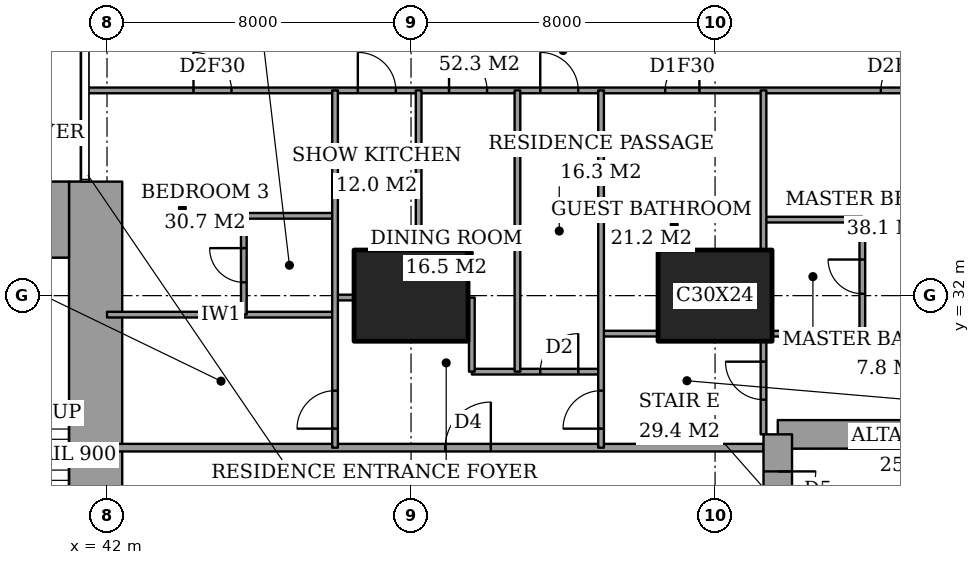
"""IFC4 building model, lengths in metres.
Left out: names, types, materials, properties, quantities, classifications, styles, units other than length and angle.
Written with IfcOpenShell. Run it as: python <this file> out.ifc"""

import sys

from ifc_helpers import new_model, si_unit, direction, frame, frame_2d, origin, origin_2d, place, context, subcontext, project, spatial, rectangle, extrude, element, fill, save


model = new_model("IFC4")
c1 = context("Model", 3, precision=1e-05, world=origin(), true_north=direction((0.0, 1.0)))
c2 = subcontext(c1, "Body", "Model", "MODEL_VIEW")
j1 = project(units=[si_unit("LENGTHUNIT", "METRE"), si_unit("PLANEANGLEUNIT", "RADIAN")], contexts=[c1])
p1 = place(None, origin())
s1 = spatial("IfcSite", under=j1, at=p1, CompositionType="ELEMENT")
p2 = place(p1, origin())
s2 = spatial("IfcBuilding", under=s1, at=p2, CompositionType="ELEMENT")
p3 = place(p2, frame((0.0, 0.0, 29.6)))
s3 = spatial("IfcBuildingStorey", under=s2, at=p3, CompositionType="ELEMENT", Elevation=29.6)
for number, where, z_axis, x_axis in (
    (1, (50.0, 32.0, 0.0), (0.0, 0.0, 1.0), (1.0, 0.0, 0.0)),
    (2, (58.0, 32.0, 0.0), (0.0, 0.0, 1.0), (1.0, 0.0, 0.0)),
):
    element("IfcColumn", number, at=place(p3, frame(where, z_axis=z_axis, x_axis=x_axis)), inside=s3, PredefinedType="COLUMN", context=c2, shape_type="SweptSolid", body=[
        extrude(rectangle(XDim=3.0, YDim=2.4, at=origin_2d()), origin(), (0.0, 0.0, 1.0), 3.6),
    ])
p4 = place(p3, frame((37.85, 34.0, 0.0), z_axis=(0.0, 0.0, 1.0), x_axis=(1.0, 0.0, 0.0)))
e3 = element("IfcWall", 3, at=p4, inside=s3, PredefinedType="SHEAR", context=c2, shape_type="SweptSolid", body=[
    extrude(rectangle(XDim=3.15, YDim=2.0, at=frame_2d((1.575, 0.0))), origin(), (0.0, 0.0, 1.0), 3.6),
])
p5 = place(p3, frame((41.7, 24.85, 0.0), z_axis=(0.0, 0.0, 1.0), x_axis=(0.0, 1.0, 0.0)))
e4 = element("IfcWall", 4, at=p5, inside=s3, PredefinedType="SHEAR", context=c2, shape_type="SweptSolid", body=[
    extrude(rectangle(XDim=10.15, YDim=1.4, at=frame_2d((5.075, 0.0))), origin(), (0.0, 0.0, 1.0), 3.6),
])
p6 = place(p3, frame((64.1, 28.35, 0.0), z_axis=(0.0, 0.0, 1.0), x_axis=(-1.0, 0.0, 0.0)))
e5 = element("IfcWall", 5, at=p6, inside=s3, PredefinedType="SHEAR", context=c2, shape_type="SweptSolid", body=[
    extrude(rectangle(XDim=4.45, YDim=0.75, at=frame_2d((2.225, 0.0))), origin(), (0.0, 0.0, 1.0), 3.6),
])
p7 = place(p3, frame((59.65, 28.35, 0.0), z_axis=(0.0, 0.0, 1.0), x_axis=(0.0, -1.0, 0.0)))
e6 = element("IfcWall", 6, at=p7, inside=s3, PredefinedType="SHEAR", context=c2, shape_type="SweptSolid", body=[
    extrude(rectangle(XDim=8.7, YDim=0.75, at=frame_2d((4.35, 0.0))), origin(), (0.0, 0.0, 1.0), 3.6),
])
p8 = place(p7, frame((0.975, 0.0, 0.0)))
e7 = element("IfcOpeningElement", 7, at=p8, cuts=e6, PredefinedType="OPENING", context=c2, shape_type="SweptSolid", body=[
    extrude(rectangle(XDim=1.0, YDim=2.1, at=frame_2d((0.5, 1.05))), frame((0.0, 0.385, 0.0), z_axis=(0.0, -1.0, 0.0), x_axis=(1.0, 0.0, 0.0)), (0.0, 0.0, 1.0), 0.77),
])
p9 = place(p3, frame((42.0, 28.0, 0.0), z_axis=(0.0, 0.0, 1.0), x_axis=(1.0, 0.0, 0.0)))
e8 = element("IfcWall", 8, at=p9, inside=s3, PredefinedType="PARTITIONING", context=c2, shape_type="SweptSolid", body=[
    extrude(rectangle(XDim=17.275, YDim=0.2, at=frame_2d((8.637, 0.0))), origin(), (0.0, 0.0, 1.0), 3.35),
])
p10 = place(p9, frame((8.9, 0.0, 0.0)))
e9 = element("IfcOpeningElement", 9, at=p10, cuts=e8, PredefinedType="OPENING", context=c2, shape_type="SweptSolid", body=[
    extrude(rectangle(XDim=1.2, YDim=2.4, at=frame_2d((0.6, 1.2))), frame((0.0, 0.11, 0.0), z_axis=(0.0, -1.0, 0.0), x_axis=(1.0, 0.0, 0.0)), (0.0, 0.0, 1.0), 0.22),
])
p11 = place(p3, frame((51.6, 30.0, 0.0), z_axis=(0.0, 0.0, 1.0), x_axis=(1.0, 0.0, 0.0)))
e10 = element("IfcWall", 10, at=p11, inside=s3, PredefinedType="PARTITIONING", context=c2, shape_type="SweptSolid", body=[
    extrude(rectangle(XDim=3.4, YDim=0.15, at=frame_2d((1.7, 0.0))), origin(), (0.0, 0.0, 1.0), 3.35),
])
p12 = place(p11, frame((1.8, 0.0, 0.0)))
e11 = element("IfcOpeningElement", 11, at=p12, cuts=e10, PredefinedType="OPENING", context=c2, shape_type="SweptSolid", body=[
    extrude(rectangle(XDim=1.0, YDim=2.1, at=frame_2d((0.5, 1.05))), frame((0.0, 0.085, 0.0), z_axis=(0.0, -1.0, 0.0), x_axis=(1.0, 0.0, 0.0)), (0.0, 0.0, 1.0), 0.17),
])
p13 = place(p3, frame((55.0, 31.0, 0.0), z_axis=(0.0, 0.0, 1.0), x_axis=(1.0, 0.0, 0.0)))
e12 = element("IfcWall", 12, at=p13, inside=s3, PredefinedType="PARTITIONING", context=c2, shape_type="SweptSolid", body=[
    extrude(rectangle(XDim=1.5, YDim=0.15, at=frame_2d((0.75, 0.0))), origin(), (0.0, 0.0, 1.0), 3.35),
])
p14 = place(p3, frame((59.5, 31.0, 0.0), z_axis=(0.0, 0.0, 1.0), x_axis=(1.0, 0.0, 0.0)))
e13 = element("IfcWall", 13, at=p14, inside=s3, PredefinedType="PARTITIONING", context=c2, shape_type="SweptSolid", body=[
    extrude(rectangle(XDim=5.15, YDim=0.15, at=frame_2d((2.575, 0.0))), origin(), (0.0, 0.0, 1.0), 3.35),
])
p15 = place(p3, frame((42.0, 31.5, 0.0), z_axis=(0.0, 0.0, 1.0), x_axis=(1.0, 0.0, 0.0)))
e14 = element("IfcWall", 14, at=p15, inside=s3, PredefinedType="PARTITIONING", context=c2, shape_type="SweptSolid", body=[
    extrude(rectangle(XDim=6.0, YDim=0.15, at=frame_2d((3.0, 0.0))), origin(), (0.0, 0.0, 1.0), 3.35),
])
p16 = place(p3, frame((48.0, 31.95, 0.0), z_axis=(0.0, 0.0, 1.0), x_axis=(1.0, 0.0, 0.0)))
e15 = element("IfcWall", 15, at=p16, inside=s3, PredefinedType="PARTITIONING", context=c2, shape_type="SweptSolid", body=[
    extrude(rectangle(XDim=0.5, YDim=0.15, at=frame_2d((0.25, 0.0))), origin(), (0.0, 0.0, 1.0), 2.634),
])
p17 = place(p3, frame((59.275, 34.0, 0.0), z_axis=(0.0, 0.0, 1.0), x_axis=(1.0, 0.0, 0.0)))
e16 = element("IfcWall", 16, at=p17, inside=s3, PredefinedType="PARTITIONING", context=c2, shape_type="SweptSolid", body=[
    extrude(rectangle(XDim=2.6, YDim=0.15, at=frame_2d((1.3, 0.0))), origin(), (0.0, 0.0, 1.0), 3.35),
])
p18 = place(p3, frame((45.6, 34.1, 0.0), z_axis=(0.0, 0.0, 1.0), x_axis=(1.0, 0.0, 0.0)))
e17 = element("IfcWall", 17, at=p18, inside=s3, PredefinedType="PARTITIONING", context=c2, shape_type="SweptSolid", body=[
    extrude(rectangle(XDim=2.4, YDim=0.15, at=frame_2d((1.2, 0.0))), origin(), (0.0, 0.0, 1.0), 3.35),
])
p19 = place(p3, frame((41.439, 37.4, 0.0), z_axis=(0.0, 0.0, 1.0), x_axis=(1.0, 0.0, 0.0)))
e18 = element("IfcWall", 18, at=p19, inside=s3, PredefinedType="PARTITIONING", context=c2, shape_type="SweptSolid", body=[
    extrude(rectangle(XDim=25.011, YDim=0.15, at=frame_2d((12.505, 0.0))), origin(), (0.0, 0.0, 1.0), 3.35),
])
p20 = place(p19, frame((11.961, 0.0, 0.0)))
e19 = element("IfcOpeningElement", 19, at=p20, cuts=e18, PredefinedType="OPENING", context=c2, shape_type="SweptSolid", body=[
    extrude(rectangle(XDim=1.0, YDim=2.1, at=frame_2d((0.5, 1.05))), frame((0.0, 0.085, 0.0), z_axis=(0.0, -1.0, 0.0), x_axis=(1.0, 0.0, 0.0)), (0.0, 0.0, 1.0), 0.17),
])
p21 = place(p19, frame((20.924, 0.0, 0.0)))
e20 = element("IfcOpeningElement", 20, at=p21, cuts=e18, PredefinedType="OPENING", context=c2, shape_type="SweptSolid", body=[
    extrude(rectangle(XDim=1.0, YDim=2.1, at=frame_2d((0.5, 1.05))), frame((0.0, 0.085, 0.0), z_axis=(0.0, -1.0, 0.0), x_axis=(1.0, 0.0, 0.0)), (0.0, 0.0, 1.0), 0.17),
])
p22 = place(p19, frame((15.249, 0.0, 0.0)))
e21 = element("IfcOpeningElement", 21, at=p22, cuts=e18, PredefinedType="OPENING", context=c2, shape_type="SweptSolid", body=[
    extrude(rectangle(XDim=0.9, YDim=2.1, at=frame_2d((0.45, 1.05))), frame((0.0, 0.085, 0.0), z_axis=(0.0, -1.0, 0.0), x_axis=(1.0, 0.0, 0.0)), (0.0, 0.0, 1.0), 0.17),
])
p23 = place(p19, frame((9.561, 0.0, 0.0)))
e22 = element("IfcOpeningElement", 22, at=p23, cuts=e18, PredefinedType="OPENING", context=c2, shape_type="SweptSolid", body=[
    extrude(rectangle(XDim=1.0, YDim=2.1, at=frame_2d((0.5, 1.05))), frame((0.0, 0.085, 0.0), z_axis=(0.0, -1.0, 0.0), x_axis=(1.0, 0.0, 0.0)), (0.0, 0.0, 1.0), 0.17),
])
p24 = place(p19, frame((7.161, 0.0, 0.0)))
e23 = element("IfcOpeningElement", 23, at=p24, cuts=e18, PredefinedType="OPENING", context=c2, shape_type="SweptSolid", body=[
    extrude(rectangle(XDim=1.0, YDim=2.1, at=frame_2d((0.5, 1.05))), frame((0.0, 0.085, 0.0), z_axis=(0.0, -1.0, 0.0), x_axis=(1.0, 0.0, 0.0)), (0.0, 0.0, 1.0), 0.17),
])
p25 = place(p19, frame((2.836, 0.0, 0.0)))
e24 = element("IfcOpeningElement", 24, at=p25, cuts=e18, PredefinedType="OPENING", context=c2, shape_type="SweptSolid", body=[
    extrude(rectangle(XDim=1.0, YDim=2.1, at=frame_2d((0.5, 1.05))), frame((0.0, 0.085, 0.0), z_axis=(0.0, -1.0, 0.0), x_axis=(1.0, 0.0, 0.0)), (0.0, 0.0, 1.0), 0.17),
])
p26 = place(p3, frame((45.6, 31.5, 0.0), z_axis=(0.0, 0.0, 1.0), x_axis=(0.0, 1.0, 0.0)))
e25 = element("IfcWall", 25, at=p26, inside=s3, PredefinedType="PARTITIONING", context=c2, shape_type="SweptSolid", body=[
    extrude(rectangle(XDim=2.6, YDim=0.15, at=frame_2d((1.3, 0.0))), origin(), (0.0, 0.0, 1.0), 3.35),
])
p27 = place(p26, frame((0.85, 0.0, 0.0)))
e26 = element("IfcOpeningElement", 26, at=p27, cuts=e25, PredefinedType="OPENING", context=c2, shape_type="SweptSolid", body=[
    extrude(rectangle(XDim=0.9, YDim=2.1, at=frame_2d((0.45, 1.05))), frame((0.0, 0.085, 0.0), z_axis=(0.0, -1.0, 0.0), x_axis=(1.0, 0.0, 0.0)), (0.0, 0.0, 1.0), 0.17),
])
p28 = place(p3, frame((48.0, 28.0, 0.0), z_axis=(0.0, 0.0, 1.0), x_axis=(0.0, 1.0, 0.0)))
e27 = element("IfcWall", 27, at=p28, inside=s3, PredefinedType="PARTITIONING", context=c2, shape_type="SweptSolid", body=[
    extrude(rectangle(XDim=9.4, YDim=0.15, at=frame_2d((4.7, 0.0))), origin(), (0.0, 0.0, 1.0), 3.35),
])
p29 = place(p28, frame((0.5, 0.0, 0.0)))
e28 = element("IfcOpeningElement", 28, at=p29, cuts=e27, PredefinedType="OPENING", context=c2, shape_type="SweptSolid", body=[
    extrude(rectangle(XDim=1.0, YDim=2.1, at=frame_2d((0.5, 1.05))), frame((0.0, 0.085, 0.0), z_axis=(0.0, -1.0, 0.0), x_axis=(1.0, 0.0, 0.0)), (0.0, 0.0, 1.0), 0.17),
])
p30 = place(p3, frame((50.2, 33.2, 0.0), z_axis=(0.0, 0.0, 1.0), x_axis=(0.0, 1.0, 0.0)))
e29 = element("IfcWall", 29, at=p30, inside=s3, PredefinedType="PARTITIONING", context=c2, shape_type="SweptSolid", body=[
    extrude(rectangle(XDim=4.2, YDim=0.15, at=frame_2d((2.1, 0.0))), origin(), (0.0, 0.0, 1.0), 3.35),
])
p31 = place(p3, frame((51.6, 30.0, 0.0), z_axis=(0.0, 0.0, 1.0), x_axis=(0.0, 1.0, 0.0)))
e30 = element("IfcWall", 30, at=p31, inside=s3, PredefinedType="PARTITIONING", context=c2, shape_type="SweptSolid", body=[
    extrude(rectangle(XDim=1.95, YDim=0.15, at=frame_2d((0.975, 0.0))), origin(), (0.0, 0.0, 1.0), 3.35),
])
p32 = place(p3, frame((52.8, 30.0, 0.0), z_axis=(0.0, 0.0, 1.0), x_axis=(0.0, 1.0, 0.0)))
e31 = element("IfcWall", 31, at=p32, inside=s3, PredefinedType="PARTITIONING", context=c2, shape_type="SweptSolid", body=[
    extrude(rectangle(XDim=7.4, YDim=0.15, at=frame_2d((3.7, 0.0))), origin(), (0.0, 0.0, 1.0), 3.35),
])
p33 = place(p3, frame((55.0, 28.0, 0.0), z_axis=(0.0, 0.0, 1.0), x_axis=(0.0, 1.0, 0.0)))
e32 = element("IfcWall", 32, at=p33, inside=s3, PredefinedType="PARTITIONING", context=c2, shape_type="SweptSolid", body=[
    extrude(rectangle(XDim=9.4, YDim=0.15, at=frame_2d((4.7, 0.0))), origin(), (0.0, 0.0, 1.0), 3.35),
])
p34 = place(p33, frame((0.5, 0.0, 0.0)))
e33 = element("IfcOpeningElement", 33, at=p34, cuts=e32, PredefinedType="OPENING", context=c2, shape_type="SweptSolid", body=[
    extrude(rectangle(XDim=1.0, YDim=2.1, at=frame_2d((0.5, 1.05))), frame((0.0, 0.085, 0.0), z_axis=(0.0, -1.0, 0.0), x_axis=(1.0, 0.0, 0.0)), (0.0, 0.0, 1.0), 0.17),
])
p35 = place(p3, frame((59.275, 28.35, 0.0), z_axis=(0.0, 0.0, 1.0), x_axis=(0.0, 1.0, 0.0)))
e34 = element("IfcWall", 34, at=p35, inside=s3, PredefinedType="PARTITIONING", context=c2, shape_type="SweptSolid", body=[
    extrude(rectangle(XDim=2.45, YDim=0.15, at=frame_2d((1.225, 0.0))), origin(), (0.0, 0.0, 1.0), 3.35),
])
p36 = place(p35, frame((0.913, 0.0, 0.0)))
e35 = element("IfcOpeningElement", 35, at=p36, cuts=e34, PredefinedType="OPENING", context=c2, shape_type="SweptSolid", body=[
    extrude(rectangle(XDim=1.0, YDim=2.1, at=frame_2d((0.5, 1.05))), frame((0.0, 0.085, 0.0), z_axis=(0.0, -1.0, 0.0), x_axis=(1.0, 0.0, 0.0)), (0.0, 0.0, 1.0), 0.17),
])
p37 = place(p3, frame((59.275, 33.2, 0.0), z_axis=(0.0, 0.0, 1.0), x_axis=(0.0, 1.0, 0.0)))
e36 = element("IfcWall", 36, at=p37, inside=s3, PredefinedType="PARTITIONING", context=c2, shape_type="SweptSolid", body=[
    extrude(rectangle(XDim=4.2, YDim=0.15, at=frame_2d((2.1, 0.0))), origin(), (0.0, 0.0, 1.0), 3.35),
])
p38 = place(p3, frame((61.875, 31.0, 0.0), z_axis=(0.0, 0.0, 1.0), x_axis=(0.0, 1.0, 0.0)))
e37 = element("IfcWall", 37, at=p38, inside=s3, PredefinedType="PARTITIONING", context=c2, shape_type="SweptSolid", body=[
    extrude(rectangle(XDim=3.0, YDim=0.15, at=frame_2d((1.5, 0.0))), origin(), (0.0, 0.0, 1.0), 3.35),
])
p39 = place(p38, frame((1.05, 0.0, 0.0)))
e38 = element("IfcOpeningElement", 38, at=p39, cuts=e37, PredefinedType="OPENING", context=c2, shape_type="SweptSolid", body=[
    extrude(rectangle(XDim=0.9, YDim=2.1, at=frame_2d((0.45, 1.05))), frame((0.0, 0.085, 0.0), z_axis=(0.0, -1.0, 0.0), x_axis=(1.0, 0.0, 0.0)), (0.0, 0.0, 1.0), 0.17),
])
p40 = place(p20, origin())
e39 = element("IfcDoor", 39, at=p40, inside=s3, OperationType="SINGLE_SWING_RIGHT", PredefinedType="DOOR", context=c2, shape_type="SweptSolid", body=[
    extrude(rectangle(XDim=1.0, YDim=2.1, at=frame_2d((0.5, 1.05))), frame((0.0, 0.025, 0.0), z_axis=(0.0, -1.0, 0.0), x_axis=(1.0, 0.0, 0.0)), (0.0, 0.0, 1.0), 0.05),
])
fill(e19, e39)
p41 = place(p39, origin())
e40 = element("IfcDoor", 40, at=p41, inside=s3, OperationType="SINGLE_SWING_LEFT", PredefinedType="DOOR", context=c2, shape_type="SweptSolid", body=[
    extrude(rectangle(XDim=0.9, YDim=2.1, at=frame_2d((0.45, 1.05))), frame((0.0, 0.025, 0.0), z_axis=(0.0, -1.0, 0.0), x_axis=(1.0, 0.0, 0.0)), (0.0, 0.0, 1.0), 0.05),
])
fill(e38, e40)
p42 = place(p21, origin())
e41 = element("IfcDoor", 41, at=p42, inside=s3, OperationType="SINGLE_SWING_LEFT", PredefinedType="DOOR", context=c2, shape_type="SweptSolid", body=[
    extrude(rectangle(XDim=1.0, YDim=2.1, at=frame_2d((0.5, 1.05))), frame((0.0, 0.025, 0.0), z_axis=(0.0, -1.0, 0.0), x_axis=(1.0, 0.0, 0.0)), (0.0, 0.0, 1.0), 0.05),
])
fill(e20, e41)
p43 = place(p36, origin())
e42 = element("IfcDoor", 42, at=p43, inside=s3, OperationType="SINGLE_SWING_LEFT", PredefinedType="DOOR", context=c2, shape_type="SweptSolid", body=[
    extrude(rectangle(XDim=1.0, YDim=2.1, at=frame_2d((0.5, 1.05))), frame((0.0, 0.025, 0.0), z_axis=(0.0, -1.0, 0.0), x_axis=(1.0, 0.0, 0.0)), (0.0, 0.0, 1.0), 0.05),
])
fill(e35, e42)
p44 = place(p22, origin())
e43 = element("IfcDoor", 43, at=p44, inside=s3, OperationType="SINGLE_SWING_LEFT", PredefinedType="DOOR", context=c2, shape_type="SweptSolid", body=[
    extrude(rectangle(XDim=0.9, YDim=2.1, at=frame_2d((0.45, 1.05))), frame((0.0, 0.025, 0.0), z_axis=(0.0, -1.0, 0.0), x_axis=(1.0, 0.0, 0.0)), (0.0, 0.0, 1.0), 0.05),
])
fill(e21, e43)
p45 = place(p34, origin())
e44 = element("IfcDoor", 44, at=p45, inside=s3, OperationType="SINGLE_SWING_RIGHT", PredefinedType="DOOR", context=c2, shape_type="SweptSolid", body=[
    extrude(rectangle(XDim=1.0, YDim=2.1, at=frame_2d((0.5, 1.05))), frame((0.0, 0.025, 0.0), z_axis=(0.0, -1.0, 0.0), x_axis=(1.0, 0.0, 0.0)), (0.0, 0.0, 1.0), 0.05),
])
fill(e33, e44)
p46 = place(p10, origin())
e45 = element("IfcDoor", 45, at=p46, inside=s3, OperationType="SINGLE_SWING_LEFT", PredefinedType="DOOR", context=c2, shape_type="SweptSolid", body=[
    extrude(rectangle(XDim=1.2, YDim=2.4, at=frame_2d((0.6, 1.2))), frame((0.0, 0.025, 0.0), z_axis=(0.0, -1.0, 0.0), x_axis=(1.0, 0.0, 0.0)), (0.0, 0.0, 1.0), 0.05),
])
fill(e9, e45)
p47 = place(p12, origin())
e46 = element("IfcDoor", 46, at=p47, inside=s3, OperationType="SINGLE_SWING_LEFT", PredefinedType="DOOR", context=c2, shape_type="SweptSolid", body=[
    extrude(rectangle(XDim=1.0, YDim=2.1, at=frame_2d((0.5, 1.05))), frame((0.0, 0.025, 0.0), z_axis=(0.0, -1.0, 0.0), x_axis=(1.0, 0.0, 0.0)), (0.0, 0.0, 1.0), 0.05),
])
fill(e11, e46)
p48 = place(p23, origin())
e47 = element("IfcDoor", 47, at=p48, inside=s3, OperationType="SINGLE_SWING_RIGHT", PredefinedType="DOOR", context=c2, shape_type="SweptSolid", body=[
    extrude(rectangle(XDim=1.0, YDim=2.1, at=frame_2d((0.5, 1.05))), frame((0.0, 0.025, 0.0), z_axis=(0.0, -1.0, 0.0), x_axis=(1.0, 0.0, 0.0)), (0.0, 0.0, 1.0), 0.05),
])
fill(e22, e47)
p49 = place(p24, origin())
e48 = element("IfcDoor", 48, at=p49, inside=s3, OperationType="SINGLE_SWING_RIGHT", PredefinedType="DOOR", context=c2, shape_type="SweptSolid", body=[
    extrude(rectangle(XDim=1.0, YDim=2.1, at=frame_2d((0.5, 1.05))), frame((0.0, 0.025, 0.0), z_axis=(0.0, -1.0, 0.0), x_axis=(1.0, 0.0, 0.0)), (0.0, 0.0, 1.0), 0.05),
])
fill(e23, e48)
p50 = place(p27, origin())
e49 = element("IfcDoor", 49, at=p50, inside=s3, OperationType="SINGLE_SWING_LEFT", PredefinedType="DOOR", context=c2, shape_type="SweptSolid", body=[
    extrude(rectangle(XDim=0.9, YDim=2.1, at=frame_2d((0.45, 1.05))), frame((0.0, 0.025, 0.0), z_axis=(0.0, -1.0, 0.0), x_axis=(1.0, 0.0, 0.0)), (0.0, 0.0, 1.0), 0.05),
])
fill(e26, e49)
p51 = place(p25, origin())
e50 = element("IfcDoor", 50, at=p51, inside=s3, OperationType="SINGLE_SWING_RIGHT", PredefinedType="DOOR", context=c2, shape_type="SweptSolid", body=[
    extrude(rectangle(XDim=1.0, YDim=2.1, at=frame_2d((0.5, 1.05))), frame((0.0, 0.025, 0.0), z_axis=(0.0, -1.0, 0.0), x_axis=(1.0, 0.0, 0.0)), (0.0, 0.0, 1.0), 0.05),
])
fill(e24, e50)
p52 = place(p29, origin())
e51 = element("IfcDoor", 51, at=p52, inside=s3, OperationType="SINGLE_SWING_RIGHT", PredefinedType="DOOR", context=c2, shape_type="SweptSolid", body=[
    extrude(rectangle(XDim=1.0, YDim=2.1, at=frame_2d((0.5, 1.05))), frame((0.0, 0.025, 0.0), z_axis=(0.0, -1.0, 0.0), x_axis=(1.0, 0.0, 0.0)), (0.0, 0.0, 1.0), 0.05),
])
fill(e28, e51)
p53 = place(p8, origin())
e52 = element("IfcDoor", 52, at=p53, inside=s3, OperationType="SINGLE_SWING_RIGHT", PredefinedType="DOOR", context=c2, shape_type="SweptSolid", body=[
    extrude(rectangle(XDim=1.0, YDim=2.1, at=frame_2d((0.5, 1.05))), frame((0.0, 0.025, 0.0), z_axis=(0.0, -1.0, 0.0), x_axis=(1.0, 0.0, 0.0)), (0.0, 0.0, 1.0), 0.05),
])
fill(e7, e52)
save(model, sys.argv[1])
